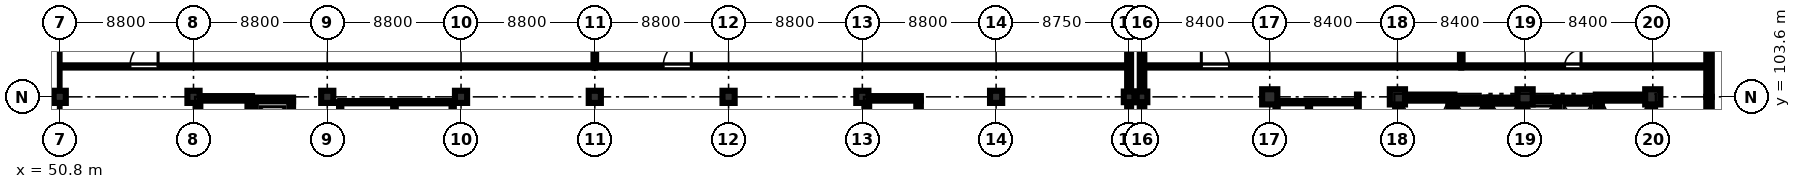
"""IFC4 building model, lengths in metres.
Left out: names, types, materials, properties, quantities, classifications, styles, units other than length and angle.
Written with IfcOpenShell. Run it as: python <this file> out.ifc"""

import sys

from ifc_helpers import new_model, si_unit, direction, frame, frame_2d, origin, origin_2d, place, context, subcontext, project, spatial, rectangle, extrude, element, fill, save


model = new_model("IFC4")
c1 = context("Model", 3, precision=1e-05, world=origin(), true_north=direction((0.0, 1.0)))
c2 = subcontext(c1, "Body", "Model", "MODEL_VIEW")
j1 = project(units=[si_unit("LENGTHUNIT", "METRE"), si_unit("PLANEANGLEUNIT", "RADIAN")], contexts=[c1])
p1 = place(None, origin())
s1 = spatial("IfcSite", under=j1, at=p1, CompositionType="ELEMENT")
p2 = place(p1, origin())
s2 = spatial("IfcBuilding", under=s1, at=p2, CompositionType="ELEMENT")
p3 = place(p2, origin())
s3 = spatial("IfcBuildingStorey", under=s2, at=p3, CompositionType="ELEMENT", Elevation=0.0)
for number, where, z_axis, x_axis in (
    (1, (50.8, 103.6, 0.0), (0.0, 0.0, 1.0), (1.0, 0.0, 0.0)),
    (2, (59.6, 103.6, 0.0), (0.0, 0.0, 1.0), (1.0, 0.0, 0.0)),
    (3, (68.4, 103.6, 0.0), (0.0, 0.0, 1.0), (1.0, 0.0, 0.0)),
    (4, (77.2, 103.6, 0.0), (0.0, 0.0, 1.0), (1.0, 0.0, 0.0)),
    (5, (86.0, 103.6, 0.0), (0.0, 0.0, 1.0), (1.0, 0.0, 0.0)),
    (6, (94.8, 103.6, 0.0), (0.0, 0.0, 1.0), (1.0, 0.0, 0.0)),
    (7, (103.6, 103.6, 0.0), (0.0, 0.0, 1.0), (1.0, 0.0, 0.0)),
    (8, (112.4, 103.6, 0.0), (0.0, 0.0, 1.0), (1.0, 0.0, 0.0)),
):
    element("IfcColumn", number, at=place(p3, frame(where, z_axis=z_axis, x_axis=x_axis)), inside=s3, PredefinedType="COLUMN", context=c2, shape_type="SweptSolid", body=[
        extrude(rectangle(XDim=0.8, YDim=0.8, at=origin_2d()), origin(), (0.0, 0.0, 1.0), 5.18),
    ])
for number, where, z_axis, x_axis in (
    (9, (121.15, 103.6, 0.0), (0.0, 0.0, 1.0), (1.0, 0.0, 0.0)),
    (10, (122.0, 103.6, 0.0), (0.0, 0.0, 1.0), (1.0, 0.0, 0.0)),
):
    element("IfcColumn", number, at=place(p3, frame(where, z_axis=z_axis, x_axis=x_axis)), inside=s3, PredefinedType="COLUMN", context=c2, shape_type="SweptSolid", body=[
        extrude(rectangle(XDim=0.7, YDim=0.7, at=origin_2d()), origin(), (0.0, 0.0, 1.0), 5.18),
    ])
for number, where, z_axis, x_axis in (
    (11, (130.4, 103.6, 0.0), (0.0, 0.0, 1.0), (1.0, 0.0, 0.0)),
    (12, (138.8, 103.6, 0.0), (0.0, 0.0, 1.0), (1.0, 0.0, 0.0)),
    (13, (147.2, 103.6, 0.0), (0.0, 0.0, 1.0), (1.0, 0.0, 0.0)),
    (14, (155.6, 103.6, 0.0), (0.0, 0.0, 1.0), (1.0, 0.0, 0.0)),
):
    element("IfcColumn", number, at=place(p3, frame(where, z_axis=z_axis, x_axis=x_axis)), inside=s3, PredefinedType="COLUMN", context=c2, shape_type="SweptSolid", body=[
        extrude(rectangle(XDim=1.0, YDim=1.0, at=origin_2d()), origin(), (0.0, 0.0, 1.0), 5.18),
    ])
p4 = place(p3, frame((138.65, 103.55, 0.0), z_axis=(0.0, 0.0, 1.0), x_axis=(1.0, 0.0, 0.0)))
e15 = element("IfcWall", 15, at=p4, inside=s3, PredefinedType="SHEAR", context=c2, shape_type="SweptSolid", body=[
    extrude(rectangle(XDim=3.9, YDim=0.4, at=frame_2d((1.95, 0.0))), origin(), (0.0, 0.0, 1.0), 5.18),
])
p5 = place(p3, frame((138.85, 95.45, 0.0), z_axis=(0.0, 0.0, 1.0), x_axis=(0.0, 1.0, 0.0)))
e16 = element("IfcWall", 16, at=p5, inside=s3, PredefinedType="SHEAR", context=c2, shape_type="SweptSolid", body=[
    extrude(rectangle(XDim=7.9, YDim=0.4, at=frame_2d((3.95, 0.0))), origin(), (0.0, 0.0, 1.0), 5.18),
])
p6 = place(p3, frame((142.35, 95.45, 0.0), z_axis=(0.0, 0.0, 1.0), x_axis=(0.0, 1.0, 0.0)))
e17 = element("IfcWall", 17, at=p6, inside=s3, PredefinedType="SHEAR", context=c2, shape_type="SweptSolid", body=[
    extrude(rectangle(XDim=7.9, YDim=0.4, at=frame_2d((3.95, 0.0))), origin(), (0.0, 0.0, 1.0), 5.18),
])
p7 = place(p6, frame((0.22, 0.0, 0.0)))
e18 = element("IfcOpeningElement", 18, at=p7, cuts=e17, PredefinedType="OPENING", context=c2, shape_type="SweptSolid", body=[
    extrude(rectangle(XDim=1.15, YDim=2.15, at=frame_2d((0.575, 1.075))), frame((0.0, 0.21, 0.0), z_axis=(0.0, -1.0, 0.0), x_axis=(1.0, 0.0, 0.0)), (0.0, 0.0, 1.0), 0.42),
])
p8 = place(p3, frame((151.85, 103.55, 0.0), z_axis=(0.0, 0.0, 1.0), x_axis=(1.0, 0.0, 0.0)))
e19 = element("IfcWall", 19, at=p8, inside=s3, PredefinedType="SHEAR", context=c2, shape_type="SweptSolid", body=[
    extrude(rectangle(XDim=3.9, YDim=0.4, at=frame_2d((1.95, 0.0))), origin(), (0.0, 0.0, 1.0), 5.18),
])
p9 = place(p3, frame((152.05, 95.45, 0.0), z_axis=(0.0, 0.0, 1.0), x_axis=(0.0, 1.0, 0.0)))
e20 = element("IfcWall", 20, at=p9, inside=s3, PredefinedType="SHEAR", context=c2, shape_type="SweptSolid", body=[
    extrude(rectangle(XDim=7.9, YDim=0.4, at=frame_2d((3.95, 0.0))), origin(), (0.0, 0.0, 1.0), 5.18),
])
p10 = place(p9, frame((0.35, 0.0, 0.0)))
e21 = element("IfcOpeningElement", 21, at=p10, cuts=e20, PredefinedType="OPENING", context=c2, shape_type="SweptSolid", body=[
    extrude(rectangle(XDim=1.15, YDim=2.15, at=frame_2d((0.575, 1.075))), frame((0.0, 0.21, 0.0), z_axis=(0.0, -1.0, 0.0), x_axis=(1.0, 0.0, 0.0)), (0.0, 0.0, 1.0), 0.42),
])
p11 = place(p3, frame((155.55, 95.45, 0.0), z_axis=(0.0, 0.0, 1.0), x_axis=(0.0, 1.0, 0.0)))
e22 = element("IfcWall", 22, at=p11, inside=s3, PredefinedType="SHEAR", context=c2, shape_type="SweptSolid", body=[
    extrude(rectangle(XDim=7.9, YDim=0.4, at=frame_2d((3.95, 0.0))), origin(), (0.0, 0.0, 1.0), 5.18),
])
p12 = place(p3, frame((59.75, 103.5, 0.0), z_axis=(0.0, 0.0, 1.0), x_axis=(1.0, 0.0, 0.0)))
e23 = element("IfcWall", 23, at=p12, inside=s3, PredefinedType="SHEAR", context=c2, shape_type="SweptSolid", body=[
    extrude(rectangle(XDim=3.7, YDim=0.3, at=frame_2d((1.85, 0.0))), origin(), (0.0, 0.0, 1.0), 5.18),
])
for number, where, z_axis, x_axis in (
    (24, (59.9, 95.45, 0.0), (0.0, 0.0, 1.0), (0.0, 1.0, 0.0)),
    (25, (63.3, 95.45, 0.0), (0.0, 0.0, 1.0), (0.0, 1.0, 0.0)),
):
    element("IfcWall", number, at=place(p3, frame(where, z_axis=z_axis, x_axis=x_axis)), inside=s3, PredefinedType="SHEAR", context=c2, shape_type="SweptSolid", body=[
        extrude(rectangle(XDim=7.9, YDim=0.3, at=frame_2d((3.95, 0.0))), origin(), (0.0, 0.0, 1.0), 5.18),
    ])
p13 = place(p3, frame((103.75, 103.5, 0.0), z_axis=(0.0, 0.0, 1.0), x_axis=(1.0, 0.0, 0.0)))
e26 = element("IfcWall", 26, at=p13, inside=s3, PredefinedType="SHEAR", context=c2, shape_type="SweptSolid", body=[
    extrude(rectangle(XDim=3.7, YDim=0.3, at=frame_2d((1.85, 0.0))), origin(), (0.0, 0.0, 1.0), 5.18),
])
for number, where, z_axis, x_axis in (
    (27, (103.9, 95.45, 0.0), (0.0, 0.0, 1.0), (0.0, 1.0, 0.0)),
    (28, (107.3, 95.45, 0.0), (0.0, 0.0, 1.0), (0.0, 1.0, 0.0)),
):
    element("IfcWall", number, at=place(p3, frame(where, z_axis=z_axis, x_axis=x_axis)), inside=s3, PredefinedType="SHEAR", context=c2, shape_type="SweptSolid", body=[
        extrude(rectangle(XDim=7.9, YDim=0.3, at=frame_2d((3.95, 0.0))), origin(), (0.0, 0.0, 1.0), 5.18),
    ])
p14 = place(p3, frame((142.55, 103.425, 0.0), z_axis=(0.0, 0.0, 1.0), x_axis=(1.0, 0.0, 0.0)))
e29 = element("IfcWall", 29, at=p14, inside=s3, PredefinedType="SHEAR", context=c2, shape_type="SweptSolid", body=[
    extrude(rectangle(XDim=2.05, YDim=0.25, at=frame_2d((1.025, 0.0))), origin(), (0.0, 0.0, 1.0), 5.18),
])
p15 = place(p3, frame((144.725, 100.15, 0.0), z_axis=(0.0, 0.0, 1.0), x_axis=(0.0, 1.0, 0.0)))
e30 = element("IfcWall", 30, at=p15, inside=s3, PredefinedType="SHEAR", context=c2, shape_type="SweptSolid", body=[
    extrude(rectangle(XDim=3.4, YDim=0.25, at=frame_2d((1.7, 0.0))), origin(), (0.0, 0.0, 1.0), 5.18),
])
p16 = place(p3, frame((144.85, 103.425, 0.0), z_axis=(0.0, 0.0, 1.0), x_axis=(1.0, 0.0, 0.0)))
e31 = element("IfcWall", 31, at=p16, inside=s3, PredefinedType="SHEAR", context=c2, shape_type="SweptSolid", body=[
    extrude(rectangle(XDim=2.05, YDim=0.25, at=frame_2d((1.025, 0.0))), origin(), (0.0, 0.0, 1.0), 5.18),
])
p17 = place(p3, frame((147.025, 100.15, 0.0), z_axis=(0.0, 0.0, 1.0), x_axis=(0.0, 1.0, 0.0)))
e32 = element("IfcWall", 32, at=p17, inside=s3, PredefinedType="SHEAR", context=c2, shape_type="SweptSolid", body=[
    extrude(rectangle(XDim=3.4, YDim=0.25, at=frame_2d((1.7, 0.0))), origin(), (0.0, 0.0, 1.0), 5.18),
])
p18 = place(p3, frame((147.15, 103.425, 0.0), z_axis=(0.0, 0.0, 1.0), x_axis=(1.0, 0.0, 0.0)))
e33 = element("IfcWall", 33, at=p18, inside=s3, PredefinedType="SHEAR", context=c2, shape_type="SweptSolid", body=[
    extrude(rectangle(XDim=2.05, YDim=0.25, at=frame_2d((1.025, 0.0))), origin(), (0.0, 0.0, 1.0), 5.18),
])
p19 = place(p3, frame((149.325, 100.35, 0.0), z_axis=(0.0, 0.0, 1.0), x_axis=(0.0, 1.0, 0.0)))
e34 = element("IfcWall", 34, at=p19, inside=s3, PredefinedType="SHEAR", context=c2, shape_type="SweptSolid", body=[
    extrude(rectangle(XDim=3.2, YDim=0.25, at=frame_2d((1.6, 0.0))), origin(), (0.0, 0.0, 1.0), 5.18),
])
p20 = place(p3, frame((149.45, 103.425, 0.0), z_axis=(0.0, 0.0, 1.0), x_axis=(1.0, 0.0, 0.0)))
e35 = element("IfcWall", 35, at=p20, inside=s3, PredefinedType="SHEAR", context=c2, shape_type="SweptSolid", body=[
    extrude(rectangle(XDim=2.4, YDim=0.25, at=frame_2d((1.2, 0.0))), origin(), (0.0, 0.0, 1.0), 5.18),
])
p21 = place(p3, frame((63.45, 103.425, 0.0), z_axis=(0.0, 0.0, 1.0), x_axis=(1.0, 0.0, 0.0)))
e36 = element("IfcWall", 36, at=p21, inside=s3, PredefinedType="SHEAR", context=c2, shape_type="SweptSolid", body=[
    extrude(rectangle(XDim=2.7, YDim=0.25, at=frame_2d((1.35, 0.0))), origin(), (0.0, 0.0, 1.0), 5.18),
])
for number, where, z_axis, x_axis in (
    (37, (63.575, 100.8, 0.0), (0.0, 0.0, 1.0), (0.0, 1.0, 0.0)),
    (38, (66.025, 100.8, 0.0), (0.0, 0.0, 1.0), (0.0, 1.0, 0.0)),
):
    element("IfcWall", number, at=place(p3, frame(where, z_axis=z_axis, x_axis=x_axis)), inside=s3, PredefinedType="SHEAR", context=c2, shape_type="SweptSolid", body=[
        extrude(rectangle(XDim=2.5, YDim=0.25, at=frame_2d((1.25, 0.0))), origin(), (0.0, 0.0, 1.0), 5.18),
    ])
p22 = place(p3, frame((121.15, 103.25, 0.0), z_axis=(0.0, 0.0, 1.0), x_axis=(0.0, -1.0, 0.0)))
e39 = element("IfcWall", 39, at=p22, inside=s3, PredefinedType="STANDARD", context=c2, shape_type="SweptSolid", body=[
    extrude(rectangle(XDim=7.7, YDim=0.26, at=frame_2d((3.85, 0.0))), origin(), (0.0, 0.0, 1.0), 4.53),
])
p23 = place(p3, frame((121.15, 107.42, 0.0), z_axis=(0.0, 0.0, 1.0), x_axis=(0.0, -1.0, 0.0)))
e40 = element("IfcWall", 40, at=p23, inside=s3, PredefinedType="STANDARD", context=c2, shape_type="SweptSolid", body=[
    extrude(rectangle(XDim=3.47, YDim=0.26, at=frame_2d((1.735, 0.0))), origin(), (0.0, 0.0, 1.0), 4.53),
])
p24 = place(p3, frame((159.3, 103.6, 0.0), z_axis=(0.0, 0.0, 1.0), x_axis=(0.0, -1.0, 0.0)))
e41 = element("IfcWall", 41, at=p24, inside=s3, PredefinedType="STANDARD", context=c2, shape_type="SweptSolid", body=[
    extrude(rectangle(XDim=8.4, YDim=0.36, at=frame_2d((4.2, 0.0))), origin(), (0.0, 0.0, 1.0), 4.78),
])
p25 = place(p24, frame((1.15, 0.0, 1.1)))
e42 = element("IfcOpeningElement", 42, at=p25, cuts=e41, PredefinedType="OPENING", context=c2, shape_type="SweptSolid", body=[
    extrude(rectangle(XDim=1.4, YDim=1.4, at=frame_2d((0.7, 0.7))), frame((0.0, 0.19, 0.0), z_axis=(0.0, -1.0, 0.0), x_axis=(1.0, 0.0, 0.0)), (0.0, 0.0, 1.0), 0.38),
])
p26 = place(p3, frame((159.3, 107.11, 0.0), z_axis=(0.0, 0.0, 1.0), x_axis=(0.0, -1.0, 0.0)))
e43 = element("IfcWall", 43, at=p26, inside=s3, PredefinedType="STANDARD", context=c2, shape_type="SweptSolid", body=[
    extrude(rectangle(XDim=3.51, YDim=0.36, at=frame_2d((1.755, 0.0))), origin(), (0.0, 0.0, 1.0), 4.78),
])
p27 = place(p26, frame((1.95, 0.0, 1.1)))
e44 = element("IfcOpeningElement", 44, at=p27, cuts=e43, PredefinedType="OPENING", context=c2, shape_type="SweptSolid", body=[
    extrude(rectangle(XDim=1.2, YDim=1.8, at=frame_2d((0.6, 0.9))), frame((0.0, 0.19, 0.0), z_axis=(0.0, -1.0, 0.0), x_axis=(1.0, 0.0, 0.0)), (0.0, 0.0, 1.0), 0.38),
])
p28 = place(p3, frame((122.0, 95.55, 0.0), z_axis=(0.0, 0.0, 1.0), x_axis=(0.0, 1.0, 0.0)))
e45 = element("IfcWall", 45, at=p28, inside=s3, PredefinedType="STANDARD", context=c2, shape_type="SweptSolid", body=[
    extrude(rectangle(XDim=7.7, YDim=0.3, at=frame_2d((3.85, 0.0))), origin(), (0.0, 0.0, 1.0), 4.43),
])
p29 = place(p3, frame((122.0, 103.95, 0.0), z_axis=(0.0, 0.0, 1.0), x_axis=(0.0, 1.0, 0.0)))
e46 = element("IfcWall", 46, at=p29, inside=s3, PredefinedType="STANDARD", context=c2, shape_type="SweptSolid", body=[
    extrude(rectangle(XDim=3.54, YDim=0.3, at=frame_2d((1.77, 0.0))), origin(), (0.0, 0.0, 1.0), 4.43),
])
p30 = place(p3, frame((69.25, 94.68, 0.0), z_axis=(0.0, 0.0, 1.0), x_axis=(0.0, 1.0, 0.0)))
e47 = element("IfcWall", 47, at=p30, inside=s3, PredefinedType="PARTITIONING", context=c2, shape_type="SweptSolid", body=[
    extrude(rectangle(XDim=8.57, YDim=0.15, at=frame_2d((4.285, 0.0))), origin(), (0.0, 0.0, 1.0), 5.18),
])
p31 = place(p3, frame((72.82, 94.68, 0.0), z_axis=(0.0, 0.0, 1.0), x_axis=(0.0, 1.0, 0.0)))
e48 = element("IfcWall", 48, at=p31, inside=s3, PredefinedType="PARTITIONING", context=c2, shape_type="SweptSolid", body=[
    extrude(rectangle(XDim=8.57, YDim=0.172, at=frame_2d((4.285, 0.0))), origin(), (0.0, 0.0, 1.0), 4.73),
])
p32 = place(p3, frame((69.25, 103.25, 0.0), z_axis=(0.0, 0.0, 1.0), x_axis=(1.0, 0.0, 0.0)))
e49 = element("IfcWall", 49, at=p32, inside=s3, PredefinedType="PARTITIONING", context=c2, shape_type="SweptSolid", body=[
    extrude(rectangle(XDim=7.4, YDim=0.15, at=frame_2d((3.7, 0.0))), origin(), (0.0, 0.0, 1.0), 5.18),
])
p33 = place(p3, frame((76.65, 94.68, 0.0), z_axis=(0.0, 0.0, 1.0), x_axis=(0.0, 1.0, 0.0)))
e50 = element("IfcWall", 50, at=p33, inside=s3, PredefinedType="PARTITIONING", context=c2, shape_type="SweptSolid", body=[
    extrude(rectangle(XDim=8.57, YDim=0.15, at=frame_2d((4.285, 0.0))), origin(), (0.0, 0.0, 1.0), 5.18),
])
p34 = place(p3, frame((50.92, 105.6, 0.0), z_axis=(0.0, 0.0, 1.0), x_axis=(1.0, 0.0, 0.0)))
e51 = element("IfcWall", 51, at=p34, inside=s3, PredefinedType="PARTITIONING", context=c2, shape_type="SweptSolid", body=[
    extrude(rectangle(XDim=35.08, YDim=0.145, at=frame_2d((17.54, 0.0))), origin(), (0.0, 0.0, 1.0), 5.18),
])
p35 = place(p34, frame((4.5, 0.0, 0.0)))
e52 = element("IfcOpeningElement", 52, at=p35, cuts=e51, PredefinedType="OPENING", context=c2, shape_type="SweptSolid", body=[
    extrude(rectangle(XDim=1.85, YDim=2.25, at=frame_2d((0.925, 1.125))), frame((0.0, 0.083, 0.0), z_axis=(0.0, -1.0, 0.0), x_axis=(1.0, 0.0, 0.0)), (0.0, 0.0, 1.0), 0.165),
])
p36 = place(p3, frame((86.0, 105.6, 0.0), z_axis=(0.0, 0.0, 1.0), x_axis=(1.0, 0.0, 0.0)))
e53 = element("IfcWall", 53, at=p36, inside=s3, PredefinedType="PARTITIONING", context=c2, shape_type="SweptSolid", body=[
    extrude(rectangle(XDim=35.02, YDim=0.145, at=frame_2d((17.51, 0.0))), origin(), (0.0, 0.0, 1.0), 5.18),
])
p37 = place(p36, frame((4.5, 0.0, 0.0)))
e54 = element("IfcOpeningElement", 54, at=p37, cuts=e53, PredefinedType="OPENING", context=c2, shape_type="SweptSolid", body=[
    extrude(rectangle(XDim=1.85, YDim=2.25, at=frame_2d((0.925, 1.125))), frame((0.0, 0.083, 0.0), z_axis=(0.0, -1.0, 0.0), x_axis=(1.0, 0.0, 0.0)), (0.0, 0.0, 1.0), 0.165),
])
p38 = place(p3, frame((86.0, 105.6, 0.0), z_axis=(0.0, 0.0, 1.0), x_axis=(0.0, 1.0, 0.0)))
e55 = element("IfcWall", 55, at=p38, inside=s3, PredefinedType="PARTITIONING", context=c2, shape_type="SweptSolid", body=[
    extrude(rectangle(XDim=1.58, YDim=0.172, at=frame_2d((0.79, 0.0))), origin(), (0.0, 0.0, 1.0), 4.53),
])
p39 = place(p3, frame((132.98, 94.68, 0.0), z_axis=(0.0, 0.0, 1.0), x_axis=(0.0, 1.0, 0.0)))
e56 = element("IfcWall", 56, at=p39, inside=s3, PredefinedType="PARTITIONING", context=c2, shape_type="SweptSolid", body=[
    extrude(rectangle(XDim=8.57, YDim=0.15, at=frame_2d((4.285, 0.0))), origin(), (0.0, 0.0, 1.0), 5.18),
])
p40 = place(p39, frame((0.9, 0.0, 0.0)))
e57 = element("IfcOpeningElement", 57, at=p40, cuts=e56, PredefinedType="OPENING", context=c2, shape_type="SweptSolid", body=[
    extrude(rectangle(XDim=1.0, YDim=2.12, at=frame_2d((0.5, 1.06))), frame((0.0, 0.085, 0.0), z_axis=(0.0, -1.0, 0.0), x_axis=(1.0, 0.0, 0.0)), (0.0, 0.0, 1.0), 0.17),
])
p41 = place(p39, frame((3.7, 0.0, 0.0)))
e58 = element("IfcOpeningElement", 58, at=p41, cuts=e56, PredefinedType="OPENING", context=c2, shape_type="SweptSolid", body=[
    extrude(rectangle(XDim=0.92, YDim=2.1, at=frame_2d((0.46, 1.05))), frame((0.0, 0.085, 0.0), z_axis=(0.0, -1.0, 0.0), x_axis=(1.0, 0.0, 0.0)), (0.0, 0.0, 1.0), 0.17),
])
p42 = place(p39, frame((6.5, 0.0, 0.0)))
e59 = element("IfcOpeningElement", 59, at=p42, cuts=e56, PredefinedType="OPENING", context=c2, shape_type="SweptSolid", body=[
    extrude(rectangle(XDim=0.92, YDim=2.1, at=frame_2d((0.46, 1.05))), frame((0.0, 0.085, 0.0), z_axis=(0.0, -1.0, 0.0), x_axis=(1.0, 0.0, 0.0)), (0.0, 0.0, 1.0), 0.17),
])
p43 = place(p3, frame((130.85, 103.25, 0.0), z_axis=(0.0, 0.0, 1.0), x_axis=(1.0, 0.0, 0.0)))
e60 = element("IfcWall", 60, at=p43, inside=s3, PredefinedType="PARTITIONING", context=c2, shape_type="SweptSolid", body=[
    extrude(rectangle(XDim=5.35, YDim=0.15, at=frame_2d((2.675, 0.0))), origin(), (0.0, 0.0, 1.0), 5.18),
])
p44 = place(p3, frame((130.85, 94.68, 0.0), z_axis=(0.0, 0.0, 1.0), x_axis=(0.0, 1.0, 0.0)))
e61 = element("IfcWall", 61, at=p44, inside=s3, PredefinedType="PARTITIONING", context=c2, shape_type="SweptSolid", body=[
    extrude(rectangle(XDim=8.57, YDim=0.15, at=frame_2d((4.285, 0.0))), origin(), (0.0, 0.0, 1.0), 5.18),
])
p45 = place(p3, frame((136.2, 94.68, 0.0), z_axis=(0.0, 0.0, 1.0), x_axis=(0.0, 1.0, 0.0)))
e62 = element("IfcWall", 62, at=p45, inside=s3, PredefinedType="PARTITIONING", context=c2, shape_type="SweptSolid", body=[
    extrude(rectangle(XDim=9.07, YDim=0.12, at=frame_2d((4.535, 0.0))), origin(), (0.0, 0.0, 1.0), 5.18),
])
p46 = place(p3, frame((122.15, 105.6, 0.0), z_axis=(0.0, 0.0, 1.0), x_axis=(1.0, 0.0, 0.0)))
e63 = element("IfcWall", 63, at=p46, inside=s3, PredefinedType="PARTITIONING", context=c2, shape_type="SweptSolid", body=[
    extrude(rectangle(XDim=20.85, YDim=0.145, at=frame_2d((10.425, 0.0))), origin(), (0.0, 0.0, 1.0), 5.18),
])
p47 = place(p46, frame((3.75, 0.0, 0.0)))
e64 = element("IfcOpeningElement", 64, at=p47, cuts=e63, PredefinedType="OPENING", context=c2, shape_type="SweptSolid", body=[
    extrude(rectangle(XDim=1.85, YDim=2.25, at=frame_2d((0.925, 1.125))), frame((0.0, 0.083, 0.0), z_axis=(0.0, -1.0, 0.0), x_axis=(1.0, 0.0, 0.0)), (0.0, 0.0, 1.0), 0.165),
])
p48 = place(p3, frame((143.0, 105.6, 0.0), z_axis=(0.0, 0.0, 1.0), x_axis=(1.0, 0.0, 0.0)))
e65 = element("IfcWall", 65, at=p48, inside=s3, PredefinedType="PARTITIONING", context=c2, shape_type="SweptSolid", body=[
    extrude(rectangle(XDim=16.12, YDim=0.145, at=frame_2d((8.06, 0.0))), origin(), (0.0, 0.0, 1.0), 5.18),
])
p49 = place(p48, frame((6.8, 0.0, 0.0)))
e66 = element("IfcOpeningElement", 66, at=p49, cuts=e65, PredefinedType="OPENING", context=c2, shape_type="SweptSolid", body=[
    extrude(rectangle(XDim=1.08, YDim=2.15, at=frame_2d((0.54, 1.075))), frame((0.0, 0.083, 0.0), z_axis=(0.0, -1.0, 0.0), x_axis=(1.0, 0.0, 0.0)), (0.0, 0.0, 1.0), 0.165),
])
p50 = place(p3, frame((143.0, 105.6, 0.0), z_axis=(0.0, 0.0, 1.0), x_axis=(0.0, 1.0, 0.0)))
e67 = element("IfcWall", 67, at=p50, inside=s3, PredefinedType="PARTITIONING", context=c2, shape_type="SweptSolid", body=[
    extrude(rectangle(XDim=1.52, YDim=0.172, at=frame_2d((0.76, 0.0))), origin(), (0.0, 0.0, 1.0), 4.78),
])
p51 = place(p27, origin())
e68 = element("IfcWindow", 68, at=p51, inside=s3, PartitioningType="SINGLE_PANEL", PredefinedType="WINDOW", context=c2, shape_type="SweptSolid", body=[
    extrude(rectangle(XDim=1.2, YDim=1.8, at=frame_2d((0.6, 0.9))), frame((0.0, 0.03, 0.0), z_axis=(0.0, -1.0, 0.0), x_axis=(1.0, 0.0, 0.0)), (0.0, 0.0, 1.0), 0.06),
])
fill(e44, e68)
p52 = place(p35, origin())
e69 = element("IfcDoor", 69, at=p52, inside=s3, OperationType="SINGLE_SWING_RIGHT", PredefinedType="DOOR", context=c2, shape_type="SweptSolid", body=[
    extrude(rectangle(XDim=1.85, YDim=2.25, at=frame_2d((0.925, 1.125))), frame((0.0, 0.025, 0.0), z_axis=(0.0, -1.0, 0.0), x_axis=(1.0, 0.0, 0.0)), (0.0, 0.0, 1.0), 0.05),
])
fill(e52, e69)
p53 = place(p37, origin())
e70 = element("IfcDoor", 70, at=p53, inside=s3, OperationType="SINGLE_SWING_RIGHT", PredefinedType="DOOR", context=c2, shape_type="SweptSolid", body=[
    extrude(rectangle(XDim=1.85, YDim=2.25, at=frame_2d((0.925, 1.125))), frame((0.0, 0.025, 0.0), z_axis=(0.0, -1.0, 0.0), x_axis=(1.0, 0.0, 0.0)), (0.0, 0.0, 1.0), 0.05),
])
fill(e54, e70)
p54 = place(p47, origin())
e71 = element("IfcDoor", 71, at=p54, inside=s3, OperationType="SINGLE_SWING_LEFT", PredefinedType="DOOR", context=c2, shape_type="SweptSolid", body=[
    extrude(rectangle(XDim=1.85, YDim=2.25, at=frame_2d((0.925, 1.125))), frame((0.0, 0.025, 0.0), z_axis=(0.0, -1.0, 0.0), x_axis=(1.0, 0.0, 0.0)), (0.0, 0.0, 1.0), 0.05),
])
fill(e64, e71)
p55 = place(p49, origin())
e72 = element("IfcDoor", 72, at=p55, inside=s3, OperationType="SINGLE_SWING_RIGHT", PredefinedType="DOOR", context=c2, shape_type="SweptSolid", body=[
    extrude(rectangle(XDim=1.08, YDim=2.15, at=frame_2d((0.54, 1.075))), frame((0.0, 0.025, 0.0), z_axis=(0.0, -1.0, 0.0), x_axis=(1.0, 0.0, 0.0)), (0.0, 0.0, 1.0), 0.05),
])
fill(e66, e72)
save(model, sys.argv[1])
